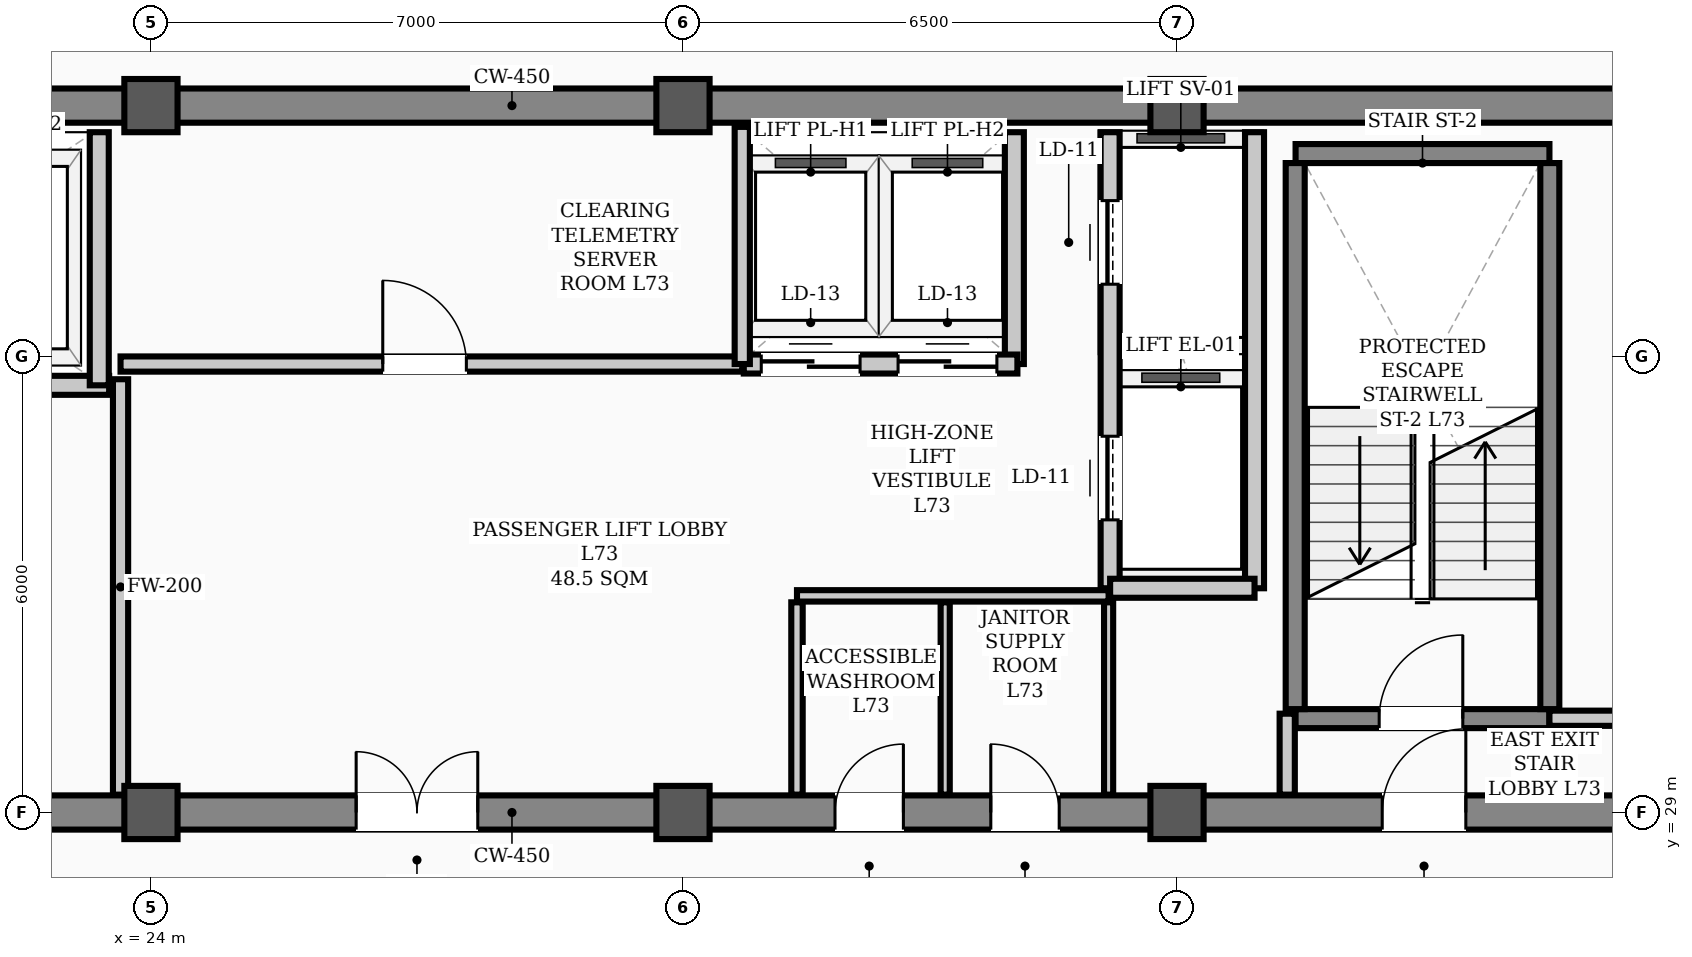
"""IFC4 building model, lengths in metres.
Left out: names, types, materials, properties, quantities, classifications, styles, units other than length and angle.
Written with IfcOpenShell. Run it as: python <this file> out.ifc"""

import sys

from ifc_helpers import new_model, si_unit, direction, frame, frame_2d, origin, origin_2d, place, context, subcontext, project, spatial, rectangle, hollow_rectangle, extrude, element, fill, save


model = new_model("IFC4")
c1 = context("Model", 3, precision=1e-05, world=origin(), true_north=direction((0.0, 1.0)))
c2 = subcontext(c1, "Body", "Model", "MODEL_VIEW")
j1 = project(units=[si_unit("LENGTHUNIT", "METRE"), si_unit("PLANEANGLEUNIT", "RADIAN")], contexts=[c1])
p1 = place(None, origin())
s1 = spatial("IfcSite", under=j1, at=p1, CompositionType="ELEMENT")
p2 = place(p1, origin())
s2 = spatial("IfcBuilding", under=s1, at=p2, CompositionType="ELEMENT")
p3 = place(p2, frame((0.0, 0.0, 293.0)))
s3 = spatial("IfcBuildingStorey", under=s2, at=p3, CompositionType="ELEMENT", Elevation=293.0)
for number, where, z_axis, x_axis in (
    (1, (24.0, 29.0, 0.0), (0.0, 0.0, 1.0), (1.0, 0.0, 0.0)),
    (2, (24.0, 38.3, 0.0), (0.0, 0.0, 1.0), (1.0, 0.0, 0.0)),
    (3, (31.0, 29.0, 0.0), (0.0, 0.0, 1.0), (1.0, 0.0, 0.0)),
    (4, (31.0, 38.3, 0.0), (0.0, 0.0, 1.0), (1.0, 0.0, 0.0)),
    (5, (37.5, 29.0, 0.0), (0.0, 0.0, 1.0), (1.0, 0.0, 0.0)),
    (6, (37.5, 38.3, 0.0), (0.0, 0.0, 1.0), (1.0, 0.0, 0.0)),
):
    element("IfcColumn", number, at=place(p3, frame(where, z_axis=z_axis, x_axis=x_axis)), inside=s3, PredefinedType="COLUMN", context=c2, shape_type="SweptSolid", body=[
        extrude(hollow_rectangle(XDim=0.7, YDim=0.7, WallThickness=0.028, InnerFilletRadius=0.014, OuterFilletRadius=0.042, at=origin_2d()), origin(), (0.0, 0.0, 1.0), 3.9),
    ])
p4 = place(p3, frame((13.5, 29.0, 0.0), z_axis=(0.0, 0.0, 1.0), x_axis=(1.0, 0.0, 0.0)))
e7 = element("IfcWall", 7, at=p4, inside=s3, PredefinedType="SHEAR", context=c2, shape_type="SweptSolid", body=[
    extrude(rectangle(XDim=30.5, YDim=0.45, at=frame_2d((15.25, 0.0))), origin(), (0.0, 0.0, 1.0), 3.72),
])
p5 = place(p4, frame((1.75, 0.0, 0.0)))
e8 = element("IfcOpeningElement", 8, at=p5, cuts=e7, PredefinedType="OPENING", context=c2, shape_type="SweptSolid", body=[
    extrude(rectangle(XDim=1.1, YDim=2.08, at=frame_2d((0.55, 1.04))), frame((0.0, 0.235, 0.0), z_axis=(0.0, -1.0, 0.0), x_axis=(1.0, 0.0, 0.0)), (0.0, 0.0, 1.0), 0.47),
])
p6 = place(p4, frame((26.7, 0.0, 0.0)))
e9 = element("IfcOpeningElement", 9, at=p6, cuts=e7, PredefinedType="OPENING", context=c2, shape_type="SweptSolid", body=[
    extrude(rectangle(XDim=1.1, YDim=2.08, at=frame_2d((0.55, 1.04))), frame((0.0, 0.235, 0.0), z_axis=(0.0, -1.0, 0.0), x_axis=(1.0, 0.0, 0.0)), (0.0, 0.0, 1.0), 0.47),
])
p7 = place(p4, frame((6.8, 0.0, 0.0)))
e10 = element("IfcOpeningElement", 10, at=p7, cuts=e7, PredefinedType="OPENING", context=c2, shape_type="SweptSolid", body=[
    extrude(rectangle(XDim=1.1, YDim=2.08, at=frame_2d((0.55, 1.04))), frame((0.0, 0.235, 0.0), z_axis=(0.0, -1.0, 0.0), x_axis=(1.0, 0.0, 0.0)), (0.0, 0.0, 1.0), 0.47),
])
p8 = place(p4, frame((13.2, 0.0, 0.0)))
e11 = element("IfcOpeningElement", 11, at=p8, cuts=e7, PredefinedType="OPENING", context=c2, shape_type="SweptSolid", body=[
    extrude(rectangle(XDim=1.6, YDim=2.08, at=frame_2d((0.8, 1.04))), frame((0.0, 0.235, 0.0), z_axis=(0.0, -1.0, 0.0), x_axis=(1.0, 0.0, 0.0)), (0.0, 0.0, 1.0), 0.47),
])
p9 = place(p4, frame((19.5, 0.0, 0.0)))
e12 = element("IfcOpeningElement", 12, at=p9, cuts=e7, PredefinedType="OPENING", context=c2, shape_type="SweptSolid", body=[
    extrude(rectangle(XDim=0.9, YDim=2.08, at=frame_2d((0.45, 1.04))), frame((0.0, 0.235, 0.0), z_axis=(0.0, -1.0, 0.0), x_axis=(1.0, 0.0, 0.0)), (0.0, 0.0, 1.0), 0.47),
])
p10 = place(p4, frame((21.55, 0.0, 0.0)))
e13 = element("IfcOpeningElement", 13, at=p10, cuts=e7, PredefinedType="OPENING", context=c2, shape_type="SweptSolid", body=[
    extrude(rectangle(XDim=0.9, YDim=2.08, at=frame_2d((0.45, 1.04))), frame((0.0, 0.235, 0.0), z_axis=(0.0, -1.0, 0.0), x_axis=(1.0, 0.0, 0.0)), (0.0, 0.0, 1.0), 0.47),
])
p11 = place(p3, frame((13.5, 38.3, 0.0), z_axis=(0.0, 0.0, 1.0), x_axis=(1.0, 0.0, 0.0)))
e14 = element("IfcWall", 14, at=p11, inside=s3, PredefinedType="SHEAR", context=c2, shape_type="SweptSolid", body=[
    extrude(rectangle(XDim=30.5, YDim=0.45, at=frame_2d((15.25, 0.0))), origin(), (0.0, 0.0, 1.0), 3.72),
])
p12 = place(p3, frame((39.06, 30.235, 0.0), z_axis=(0.0, 0.0, 1.0), x_axis=(1.0, 0.0, 0.0)))
e15 = element("IfcWall", 15, at=p12, inside=s3, PredefinedType="STANDARD", context=c2, shape_type="SweptSolid", body=[
    extrude(rectangle(XDim=3.34, YDim=0.25, at=frame_2d((1.67, 0.0))), origin(), (0.0, 0.0, 1.0), 3.72),
])
p13 = place(p12, frame((1.1, 0.0, 0.0)))
e16 = element("IfcOpeningElement", 16, at=p13, cuts=e15, PredefinedType="OPENING", context=c2, shape_type="SweptSolid", body=[
    extrude(rectangle(XDim=1.1, YDim=2.08, at=frame_2d((0.55, 1.04))), frame((0.0, 0.135, 0.0), z_axis=(0.0, -1.0, 0.0), x_axis=(1.0, 0.0, 0.0)), (0.0, 0.0, 1.0), 0.27),
])
p14 = place(p3, frame((39.06, 37.669, 0.0), z_axis=(0.0, 0.0, 1.0), x_axis=(1.0, 0.0, 0.0)))
e17 = element("IfcWall", 17, at=p14, inside=s3, PredefinedType="STANDARD", context=c2, shape_type="SweptSolid", body=[
    extrude(rectangle(XDim=3.34, YDim=0.25, at=frame_2d((1.67, 0.0))), origin(), (0.0, 0.0, 1.0), 3.72),
])
for number, where, z_axis, x_axis in (
    (18, (39.055, 30.36, 0.0), (0.0, 0.0, 1.0), (0.0, 1.0, 0.0)),
    (19, (42.405, 30.36, 0.0), (0.0, 0.0, 1.0), (0.0, 1.0, 0.0)),
):
    element("IfcWall", number, at=place(p3, frame(where, z_axis=z_axis, x_axis=x_axis)), inside=s3, PredefinedType="STANDARD", context=c2, shape_type="SweptSolid", body=[
        extrude(rectangle(XDim=7.184, YDim=0.25, at=frame_2d((3.592, 0.0))), origin(), (0.0, 0.0, 1.0), 3.72),
    ])
p15 = place(p3, frame((18.1, 34.62, 0.0), z_axis=(0.0, 0.0, 1.0), x_axis=(1.0, 0.0, 0.0)))
e20 = element("IfcWall", 20, at=p15, inside=s3, PredefinedType="STANDARD", context=c2, shape_type="SweptSolid", body=[
    extrude(rectangle(XDim=5.35, YDim=0.25, at=frame_2d((2.675, 0.0))), origin(), (0.0, 0.0, 1.0), 3.72),
])
p16 = place(p15, frame((0.85, 0.0, 0.0)))
e21 = element("IfcOpeningElement", 21, at=p16, cuts=e20, PredefinedType="OPENING", context=c2, shape_type="SweptSolid", body=[
    extrude(rectangle(XDim=1.1, YDim=2.08, at=frame_2d((0.55, 1.04))), frame((0.0, 0.135, 0.0), z_axis=(0.0, -1.0, 0.0), x_axis=(1.0, 0.0, 0.0)), (0.0, 0.0, 1.0), 0.27),
])
p17 = place(p15, frame((3.45, 0.0, 0.0)))
e22 = element("IfcOpeningElement", 22, at=p17, cuts=e20, PredefinedType="OPENING", context=c2, shape_type="SweptSolid", body=[
    extrude(rectangle(XDim=1.1, YDim=2.08, at=frame_2d((0.55, 1.04))), frame((0.0, 0.135, 0.0), z_axis=(0.0, -1.0, 0.0), x_axis=(1.0, 0.0, 0.0)), (0.0, 0.0, 1.0), 0.27),
])
p18 = place(p3, frame((36.62, 31.95, 0.0), z_axis=(0.0, 0.0, 1.0), x_axis=(0.0, 1.0, 0.0)))
e23 = element("IfcWall", 23, at=p18, inside=s3, PredefinedType="STANDARD", context=c2, shape_type="SweptSolid", body=[
    extrude(rectangle(XDim=6.0, YDim=0.25, at=frame_2d((3.0, 0.0))), origin(), (0.0, 0.0, 1.0), 3.4),
])
p19 = place(p18, frame((0.9, 0.0, 0.0)))
e24 = element("IfcOpeningElement", 24, at=p19, cuts=e23, PredefinedType="OPENING", context=c2, shape_type="SweptSolid", body=[
    extrude(rectangle(XDim=1.1, YDim=2.08, at=frame_2d((0.55, 1.04))), frame((0.0, 0.135, 0.0), z_axis=(0.0, -1.0, 0.0), x_axis=(1.0, 0.0, 0.0)), (0.0, 0.0, 1.0), 0.27),
])
p20 = place(p18, frame((4.0, 0.0, 0.0)))
e25 = element("IfcOpeningElement", 25, at=p20, cuts=e23, PredefinedType="OPENING", context=c2, shape_type="SweptSolid", body=[
    extrude(rectangle(XDim=1.1, YDim=2.08, at=frame_2d((0.55, 1.04))), frame((0.0, 0.135, 0.0), z_axis=(0.0, -1.0, 0.0), x_axis=(1.0, 0.0, 0.0)), (0.0, 0.0, 1.0), 0.27),
])
p21 = place(p3, frame((38.52, 31.95, 0.0), z_axis=(0.0, 0.0, 1.0), x_axis=(0.0, 1.0, 0.0)))
e26 = element("IfcWall", 26, at=p21, inside=s3, PredefinedType="STANDARD", context=c2, shape_type="SweptSolid", body=[
    extrude(rectangle(XDim=6.0, YDim=0.25, at=frame_2d((3.0, 0.0))), origin(), (0.0, 0.0, 1.0), 3.4),
])
p22 = place(p3, frame((36.62, 31.95, 0.0), z_axis=(0.0, 0.0, 1.0), x_axis=(1.0, 0.0, 0.0)))
e27 = element("IfcWall", 27, at=p22, inside=s3, PredefinedType="STANDARD", context=c2, shape_type="SweptSolid", body=[
    extrude(rectangle(XDim=1.9, YDim=0.25, at=frame_2d((0.95, 0.0))), origin(), (0.0, 0.0, 1.0), 3.48),
])
p23 = place(p3, frame((23.32, 34.62, 0.0), z_axis=(0.0, 0.0, 1.0), x_axis=(0.0, 1.0, 0.0)))
e28 = element("IfcWall", 28, at=p23, inside=s3, PredefinedType="STANDARD", context=c2, shape_type="SweptSolid", body=[
    extrude(rectangle(XDim=3.33, YDim=0.25, at=frame_2d((1.665, 0.0))), origin(), (0.0, 0.0, 1.0), 3.72),
])
p24 = place(p3, frame((35.36, 34.9, 0.0), z_axis=(0.0, 0.0, 1.0), x_axis=(0.0, 1.0, 0.0)))
e29 = element("IfcWall", 29, at=p24, inside=s3, PredefinedType="STANDARD", context=c2, shape_type="SweptSolid", body=[
    extrude(rectangle(XDim=3.05, YDim=0.25, at=frame_2d((1.525, 0.0))), origin(), (0.0, 0.0, 1.0), 3.4),
])
p25 = place(p3, frame((31.8, 34.9, 0.0), z_axis=(0.0, 0.0, 1.0), x_axis=(1.0, 0.0, 0.0)))
e30 = element("IfcWall", 30, at=p25, inside=s3, PredefinedType="STANDARD", context=c2, shape_type="SweptSolid", body=[
    extrude(rectangle(XDim=3.6, YDim=0.25, at=frame_2d((1.8, 0.0))), origin(), (0.0, 0.0, 1.0), 3.72),
])
p26 = place(p25, frame((0.23, 0.0, 0.0)))
e31 = element("IfcOpeningElement", 31, at=p26, cuts=e30, PredefinedType="OPENING", context=c2, shape_type="SweptSolid", body=[
    extrude(rectangle(XDim=1.3, YDim=2.08, at=frame_2d((0.65, 1.04))), frame((0.0, 0.135, 0.0), z_axis=(0.0, -1.0, 0.0), x_axis=(1.0, 0.0, 0.0)), (0.0, 0.0, 1.0), 0.27),
])
p27 = place(p25, frame((2.03, 0.0, 0.0)))
e32 = element("IfcOpeningElement", 32, at=p27, cuts=e30, PredefinedType="OPENING", context=c2, shape_type="SweptSolid", body=[
    extrude(rectangle(XDim=1.3, YDim=2.08, at=frame_2d((0.65, 1.04))), frame((0.0, 0.135, 0.0), z_axis=(0.0, -1.0, 0.0), x_axis=(1.0, 0.0, 0.0)), (0.0, 0.0, 1.0), 0.27),
])
p28 = place(p3, frame((42.4, 30.24, 0.0), z_axis=(0.0, 0.0, 1.0), x_axis=(1.0, 0.0, 0.0)))
e33 = element("IfcWall", 33, at=p28, inside=s3, PredefinedType="STANDARD", context=c2, shape_type="SweptSolid", body=[
    extrude(rectangle(XDim=1.365, YDim=0.2, at=frame_2d((0.683, 0.0))), origin(), (0.0, 0.0, 1.0), 3.2),
])
p29 = place(p3, frame((23.6, 34.9, 0.0), z_axis=(0.0, 0.0, 1.0), x_axis=(1.0, 0.0, 0.0)))
e34 = element("IfcWall", 34, at=p29, inside=s3, PredefinedType="STANDARD", context=c2, shape_type="SweptSolid", body=[
    extrude(rectangle(XDim=8.18, YDim=0.2, at=frame_2d((4.09, 0.0))), origin(), (0.0, 0.0, 1.0), 3.72),
])
p30 = place(p29, frame((3.45, 0.0, 0.0)))
e35 = element("IfcOpeningElement", 35, at=p30, cuts=e34, PredefinedType="OPENING", context=c2, shape_type="SweptSolid", body=[
    extrude(rectangle(XDim=1.1, YDim=2.08, at=frame_2d((0.55, 1.04))), frame((0.0, 0.11, 0.0), z_axis=(0.0, -1.0, 0.0), x_axis=(1.0, 0.0, 0.0)), (0.0, 0.0, 1.0), 0.22),
])
p31 = place(p3, frame((32.5, 31.85, 0.0), z_axis=(0.0, 0.0, 1.0), x_axis=(1.0, 0.0, 0.0)))
e36 = element("IfcWall", 36, at=p31, inside=s3, PredefinedType="PARTITIONING", context=c2, shape_type="SweptSolid", body=[
    extrude(rectangle(XDim=4.1, YDim=0.15, at=frame_2d((2.05, 0.0))), origin(), (0.0, 0.0, 1.0), 3.72),
])
p32 = place(p3, frame((38.95, 29.235, 0.0), z_axis=(0.0, 0.0, 1.0), x_axis=(0.0, 1.0, 0.0)))
e37 = element("IfcWall", 37, at=p32, inside=s3, PredefinedType="STANDARD", context=c2, shape_type="SweptSolid", body=[
    extrude(rectangle(XDim=1.065, YDim=0.2, at=frame_2d((0.532, 0.0))), origin(), (0.0, 0.0, 1.0), 3.4),
])
p33 = place(p3, frame((23.6, 29.235, 0.0), z_axis=(0.0, 0.0, 1.0), x_axis=(0.0, 1.0, 0.0)))
e38 = element("IfcWall", 38, at=p33, inside=s3, PredefinedType="STANDARD", context=c2, shape_type="SweptSolid", body=[
    extrude(rectangle(XDim=5.465, YDim=0.2, at=frame_2d((2.732, 0.0))), origin(), (0.0, 0.0, 1.0), 3.2),
])
p34 = place(p3, frame((32.5, 29.235, 0.0), z_axis=(0.0, 0.0, 1.0), x_axis=(0.0, 1.0, 0.0)))
e39 = element("IfcWall", 39, at=p34, inside=s3, PredefinedType="PARTITIONING", context=c2, shape_type="SweptSolid", body=[
    extrude(rectangle(XDim=2.53, YDim=0.15, at=frame_2d((1.265, 0.0))), origin(), (0.0, 0.0, 1.0), 3.4),
])
for number, where, z_axis, x_axis in (
    (40, (36.6, 29.235, 0.0), (0.0, 0.0, 1.0), (0.0, 1.0, 0.0)),
    (41, (34.45, 29.235, 0.0), (0.0, 0.0, 1.0), (0.0, 1.0, 0.0)),
):
    element("IfcWall", number, at=place(p3, frame(where, z_axis=z_axis, x_axis=x_axis)), inside=s3, PredefinedType="PARTITIONING", context=c2, shape_type="SweptSolid", body=[
        extrude(rectangle(XDim=2.53, YDim=0.12, at=frame_2d((1.265, 0.0))), origin(), (0.0, 0.0, 1.0), 3.4),
    ])
p35 = place(p3, frame((31.78, 34.9, 0.0), z_axis=(0.0, 0.0, 1.0), x_axis=(0.0, 1.0, 0.0)))
e42 = element("IfcWall", 42, at=p35, inside=s3, PredefinedType="STANDARD", context=c2, shape_type="SweptSolid", body=[
    extrude(rectangle(XDim=3.12, YDim=0.2, at=frame_2d((1.56, 0.0))), origin(), (0.0, 0.0, 1.0), 3.4),
])
p36 = place(p13, origin())
e43 = element("IfcDoor", 43, at=p36, inside=s3, OperationType="SINGLE_SWING_RIGHT", PredefinedType="DOOR", context=c2, shape_type="SweptSolid", body=[
    extrude(rectangle(XDim=1.1, YDim=2.08, at=frame_2d((0.55, 1.04))), frame((0.0, 0.025, 0.0), z_axis=(0.0, -1.0, 0.0), x_axis=(1.0, 0.0, 0.0)), (0.0, 0.0, 1.0), 0.05),
])
fill(e16, e43)
p37 = place(p6, origin())
e44 = element("IfcDoor", 44, at=p37, inside=s3, OperationType="SINGLE_SWING_RIGHT", PredefinedType="DOOR", context=c2, shape_type="SweptSolid", body=[
    extrude(rectangle(XDim=1.1, YDim=2.08, at=frame_2d((0.55, 1.04))), frame((0.0, 0.025, 0.0), z_axis=(0.0, -1.0, 0.0), x_axis=(1.0, 0.0, 0.0)), (0.0, 0.0, 1.0), 0.05),
])
fill(e9, e44)
p38 = place(p8, origin())
e45 = element("IfcDoor", 45, at=p38, inside=s3, OperationType="DOUBLE_DOOR_SINGLE_SWING", PredefinedType="DOOR", context=c2, shape_type="SweptSolid", body=[
    extrude(rectangle(XDim=1.6, YDim=2.08, at=frame_2d((0.8, 1.04))), frame((0.0, 0.025, 0.0), z_axis=(0.0, -1.0, 0.0), x_axis=(1.0, 0.0, 0.0)), (0.0, 0.0, 1.0), 0.05),
])
fill(e11, e45)
p39 = place(p30, origin())
e46 = element("IfcDoor", 46, at=p39, inside=s3, OperationType="SINGLE_SWING_LEFT", PredefinedType="DOOR", context=c2, shape_type="SweptSolid", body=[
    extrude(rectangle(XDim=1.1, YDim=2.08, at=frame_2d((0.55, 1.04))), frame((0.0, 0.025, 0.0), z_axis=(0.0, -1.0, 0.0), x_axis=(1.0, 0.0, 0.0)), (0.0, 0.0, 1.0), 0.05),
])
fill(e35, e46)
p40 = place(p9, origin())
e47 = element("IfcDoor", 47, at=p40, inside=s3, OperationType="SINGLE_SWING_RIGHT", PredefinedType="DOOR", context=c2, shape_type="SweptSolid", body=[
    extrude(rectangle(XDim=0.9, YDim=2.08, at=frame_2d((0.45, 1.04))), frame((0.0, 0.025, 0.0), z_axis=(0.0, -1.0, 0.0), x_axis=(1.0, 0.0, 0.0)), (0.0, 0.0, 1.0), 0.05),
])
fill(e12, e47)
p41 = place(p10, origin())
e48 = element("IfcDoor", 48, at=p41, inside=s3, OperationType="SINGLE_SWING_LEFT", PredefinedType="DOOR", context=c2, shape_type="SweptSolid", body=[
    extrude(rectangle(XDim=0.9, YDim=2.08, at=frame_2d((0.45, 1.04))), frame((0.0, 0.025, 0.0), z_axis=(0.0, -1.0, 0.0), x_axis=(1.0, 0.0, 0.0)), (0.0, 0.0, 1.0), 0.05),
])
fill(e13, e48)
p42 = place(p19, origin())
e49 = element("IfcDoor", 49, at=p42, inside=s3, OperationType="SLIDING_TO_LEFT", PredefinedType="DOOR", context=c2, shape_type="SweptSolid", body=[
    extrude(rectangle(XDim=1.1, YDim=2.08, at=frame_2d((0.55, 1.04))), frame((0.0, 0.025, 0.0), z_axis=(0.0, -1.0, 0.0), x_axis=(1.0, 0.0, 0.0)), (0.0, 0.0, 1.0), 0.05),
])
fill(e24, e49)
p43 = place(p20, origin())
e50 = element("IfcDoor", 50, at=p43, inside=s3, OperationType="SLIDING_TO_LEFT", PredefinedType="DOOR", context=c2, shape_type="SweptSolid", body=[
    extrude(rectangle(XDim=1.1, YDim=2.08, at=frame_2d((0.55, 1.04))), frame((0.0, 0.025, 0.0), z_axis=(0.0, -1.0, 0.0), x_axis=(1.0, 0.0, 0.0)), (0.0, 0.0, 1.0), 0.05),
])
fill(e25, e50)
p44 = place(p26, origin())
e51 = element("IfcDoor", 51, at=p44, inside=s3, OperationType="DOUBLE_DOOR_SLIDING", PredefinedType="DOOR", context=c2, shape_type="SweptSolid", body=[
    extrude(rectangle(XDim=1.3, YDim=2.08, at=frame_2d((0.65, 1.04))), frame((0.0, 0.025, 0.0), z_axis=(0.0, -1.0, 0.0), x_axis=(1.0, 0.0, 0.0)), (0.0, 0.0, 1.0), 0.05),
])
fill(e31, e51)
p45 = place(p27, origin())
e52 = element("IfcDoor", 52, at=p45, inside=s3, OperationType="DOUBLE_DOOR_SLIDING", PredefinedType="DOOR", context=c2, shape_type="SweptSolid", body=[
    extrude(rectangle(XDim=1.3, YDim=2.08, at=frame_2d((0.65, 1.04))), frame((0.0, 0.025, 0.0), z_axis=(0.0, -1.0, 0.0), x_axis=(1.0, 0.0, 0.0)), (0.0, 0.0, 1.0), 0.05),
])
fill(e32, e52)
save(model, sys.argv[1])
